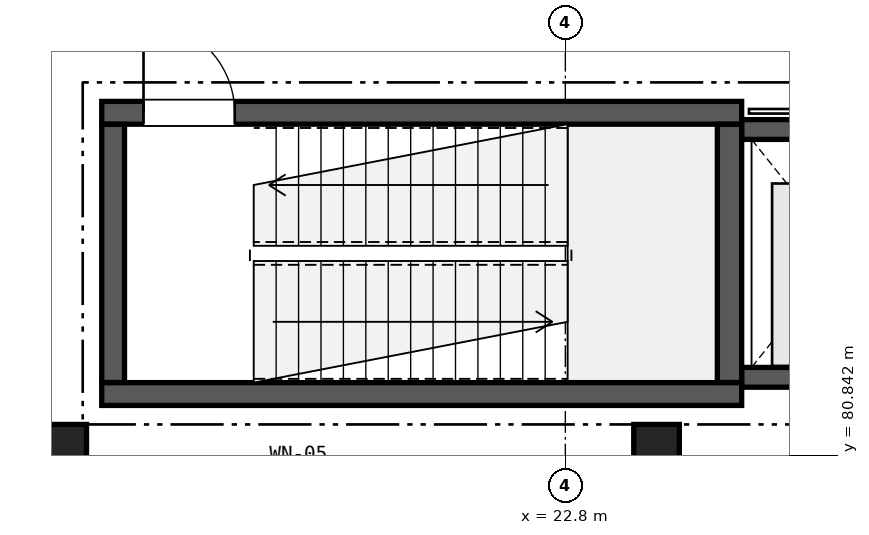
"""IFC4 building model, lengths in metres.
Left out: names, types, materials, properties, quantities, classifications, styles, units other than length and angle.
Written with IfcOpenShell. Run it as: python <this file> out.ifc"""

import sys

from ifc_helpers import new_model, si_unit, direction, frame, frame_2d, origin, origin_2d, place, context, subcontext, project, spatial, rectangle, extrude, element, fill, save


model = new_model("IFC4")
c1 = context("Model", 3, precision=1e-05, world=origin(), true_north=direction((0.0, 1.0)))
c2 = subcontext(c1, "Body", "Model", "MODEL_VIEW")
j1 = project(units=[si_unit("LENGTHUNIT", "METRE"), si_unit("PLANEANGLEUNIT", "RADIAN")], contexts=[c1])
p1 = place(None, origin())
s1 = spatial("IfcSite", under=j1, at=p1, CompositionType="ELEMENT")
p2 = place(p1, origin())
s2 = spatial("IfcBuilding", under=s1, at=p2, CompositionType="ELEMENT")
p3 = place(p2, origin())
s3 = spatial("IfcBuildingStorey", under=s2, at=p3, CompositionType="ELEMENT", Elevation=0.0)
for number, where, z_axis, x_axis in (
    (1, (16.2, 80.95, 0.0), (0.0, 0.0, 1.0), (1.0, 0.0, 0.0)),
    (2, (24.0, 80.95, 0.0), (0.0, 0.0, 1.0), (1.0, 0.0, 0.0)),
):
    element("IfcColumn", number, at=place(p3, frame(where, z_axis=z_axis, x_axis=x_axis)), inside=s3, PredefinedType="COLUMN", context=c2, shape_type="SweptSolid", body=[
        extrude(rectangle(XDim=0.6, YDim=0.6, at=origin_2d()), origin(), (0.0, 0.0, 1.0), 5.1),
    ])
p4 = place(p3, frame((16.7, 81.65, 0.0), z_axis=(0.0, 0.0, 1.0), x_axis=(1.0, 0.0, 0.0)))
e3 = element("IfcWall", 3, at=p4, inside=s3, PredefinedType="SHEAR", context=c2, shape_type="SweptSolid", body=[
    extrude(rectangle(XDim=8.42, YDim=0.3, at=frame_2d((4.21, 0.0))), origin(), (0.0, 0.0, 1.0), 4.785),
])
p5 = place(p3, frame((16.7, 85.35, 0.0), z_axis=(0.0, 0.0, 1.0), x_axis=(1.0, 0.0, 0.0)))
e4 = element("IfcWall", 4, at=p5, inside=s3, PredefinedType="SHEAR", context=c2, shape_type="SweptSolid", body=[
    extrude(rectangle(XDim=8.42, YDim=0.3, at=frame_2d((4.21, 0.0))), origin(), (0.0, 0.0, 1.0), 4.785),
])
p6 = place(p5, frame((0.55, 0.0, 0.0)))
e5 = element("IfcOpeningElement", 5, at=p6, cuts=e4, PredefinedType="OPENING", context=c2, shape_type="SweptSolid", body=[
    extrude(rectangle(XDim=1.2, YDim=2.2, at=frame_2d((0.6, 1.1))), frame((0.0, 0.16, 0.0), z_axis=(0.0, -1.0, 0.0), x_axis=(1.0, 0.0, 0.0)), (0.0, 0.0, 1.0), 0.32),
])
p7 = place(p3, frame((16.85, 81.802, 0.0), z_axis=(0.0, 0.0, 1.0), x_axis=(0.0, 1.0, 0.0)))
e6 = element("IfcWall", 6, at=p7, inside=s3, PredefinedType="SHEAR", context=c2, shape_type="SweptSolid", body=[
    extrude(rectangle(XDim=3.396, YDim=0.3, at=frame_2d((1.698, 0.0))), origin(), (0.0, 0.0, 1.0), 4.785),
])
p8 = place(p3, frame((24.96, 81.802, 0.0), z_axis=(0.0, 0.0, 1.0), x_axis=(0.0, 1.0, 0.0)))
e7 = element("IfcWall", 7, at=p8, inside=s3, PredefinedType="SHEAR", context=c2, shape_type="SweptSolid", body=[
    extrude(rectangle(XDim=3.396, YDim=0.32, at=frame_2d((1.698, 0.0))), origin(), (0.0, 0.0, 1.0), 4.785),
])
p9 = place(p3, frame((25.122, 81.87, 0.0), z_axis=(0.0, 0.0, 1.0), x_axis=(1.0, 0.0, 0.0)))
e8 = element("IfcWall", 8, at=p9, inside=s3, PredefinedType="SHEAR", context=c2, shape_type="SweptSolid", body=[
    extrude(rectangle(XDim=2.658, YDim=0.26, at=frame_2d((1.329, 0.0))), origin(), (0.0, 0.0, 1.0), 4.785),
])
p10 = place(p3, frame((25.122, 85.13, 0.0), z_axis=(0.0, 0.0, 1.0), x_axis=(1.0, 0.0, 0.0)))
e9 = element("IfcWall", 9, at=p10, inside=s3, PredefinedType="SHEAR", context=c2, shape_type="SweptSolid", body=[
    extrude(rectangle(XDim=2.658, YDim=0.26, at=frame_2d((1.329, 0.0))), origin(), (0.0, 0.0, 1.0), 4.785),
])
p11 = place(p10, frame((0.679, 0.0, 0.0)))
e10 = element("IfcOpeningElement", 10, at=p11, cuts=e9, PredefinedType="OPENING", context=c2, shape_type="SweptSolid", body=[
    extrude(rectangle(XDim=1.3, YDim=2.2, at=frame_2d((0.65, 1.1))), frame((0.0, 0.14, 0.0), z_axis=(0.0, -1.0, 0.0), x_axis=(1.0, 0.0, 0.0)), (0.0, 0.0, 1.0), 0.28),
])
p12 = place(p6, origin())
e11 = element("IfcDoor", 11, at=p12, inside=s3, OperationType="SINGLE_SWING_LEFT", PredefinedType="DOOR", context=c2, shape_type="SweptSolid", body=[
    extrude(rectangle(XDim=1.2, YDim=2.2, at=frame_2d((0.6, 1.1))), frame((0.0, 0.025, 0.0), z_axis=(0.0, -1.0, 0.0), x_axis=(1.0, 0.0, 0.0)), (0.0, 0.0, 1.0), 0.05),
])
fill(e5, e11)
save(model, sys.argv[1])
